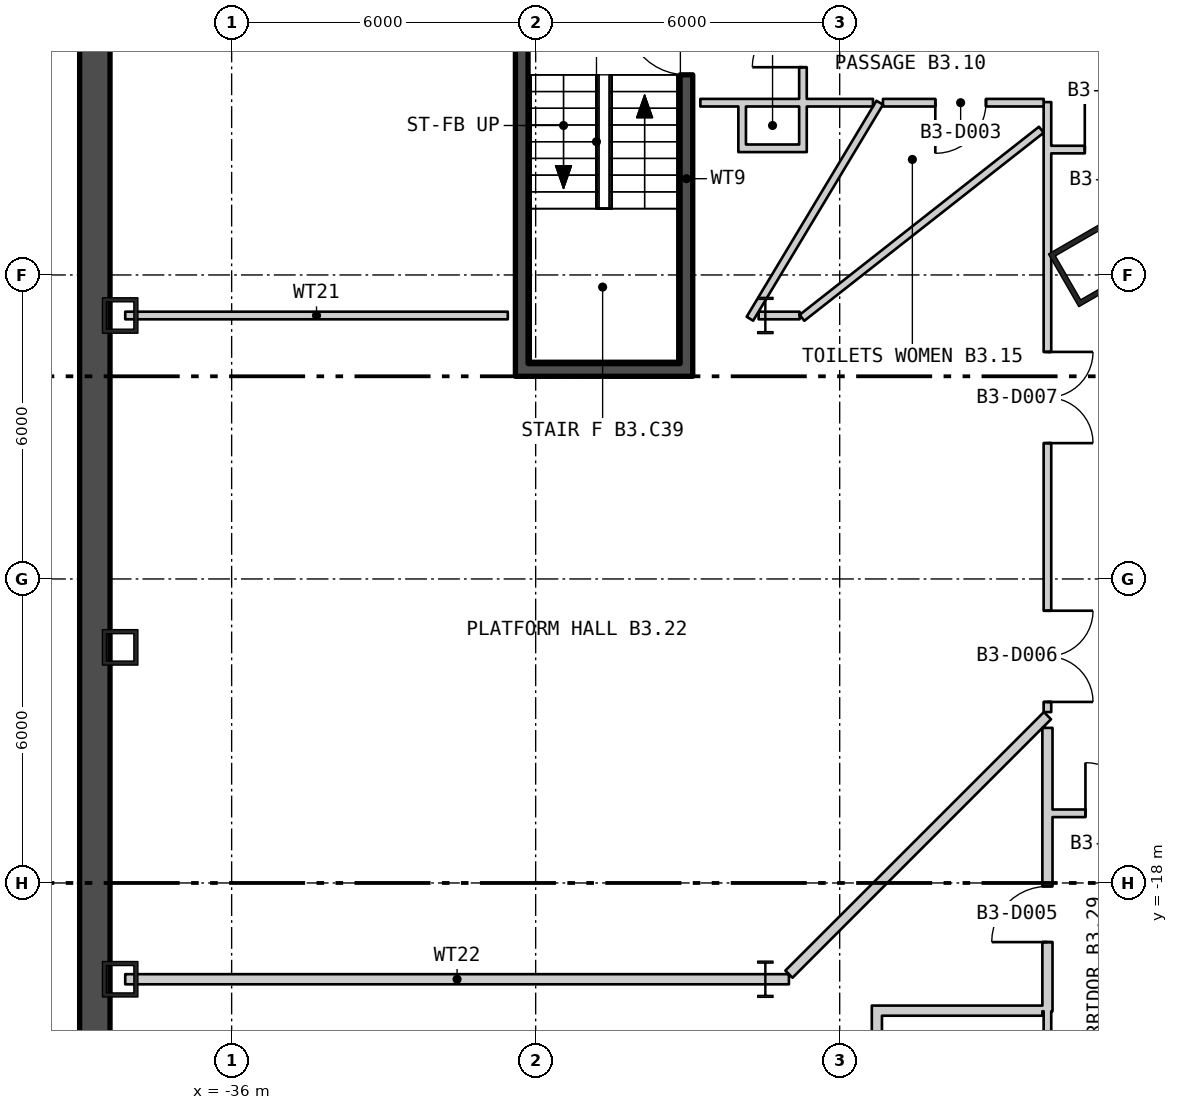
"""IFC4 building model, lengths in metres.
Left out: names, types, materials, properties, quantities, classifications, styles, units other than length and angle.
Written with IfcOpenShell. Run it as: python <this file> out.ifc"""

import sys

from ifc_helpers import new_model, si_unit, direction, frame, frame_2d, origin, origin_2d, place, context, subcontext, project, spatial, rectangle, hollow_rectangle, i_section, extrude, element, fill, save


model = new_model("IFC4")
c1 = context("Model", 3, precision=1e-05, world=origin(), true_north=direction((0.0, 1.0)))
c2 = subcontext(c1, "Body", "Model", "MODEL_VIEW")
j1 = project(units=[si_unit("LENGTHUNIT", "METRE"), si_unit("PLANEANGLEUNIT", "RADIAN")], contexts=[c1])
p1 = place(None, origin())
s1 = spatial("IfcSite", under=j1, at=p1, CompositionType="ELEMENT")
p2 = place(p1, origin())
s2 = spatial("IfcBuilding", under=s1, at=p2, CompositionType="ELEMENT")
p3 = place(p2, frame((0.0, 0.0, -16.8)))
s3 = spatial("IfcBuildingStorey", under=s2, at=p3, CompositionType="ELEMENT", Elevation=-16.8)
p4 = place(p3, frame((-19.061, -5.807, 0.0), z_axis=(0.0, 0.0, 1.0), x_axis=(0.5, -0.866025403784, 0.0)))
e1 = element("IfcColumn", 1, at=p4, inside=s3, PredefinedType="COLUMN", context=c2, shape_type="SweptSolid", body=[
    extrude(hollow_rectangle(XDim=1.2, YDim=1.2, WallThickness=0.1, at=origin_2d()), origin(), (0.0, 0.0, 1.0), 5.4),
])
for number, where, z_axis, x_axis in (
    (2, (-38.2, -6.8, 0.0), (0.0, 0.0, 1.0), (0.0, -1.0, 0.0)),
    (3, (-38.2, -13.35, 0.0), (0.0, 0.0, 1.0), (0.0, -1.0, 0.0)),
    (4, (-38.2, -19.9, 0.0), (0.0, 0.0, 1.0), (0.0, -1.0, 0.0)),
):
    element("IfcColumn", number, at=place(p3, frame(where, z_axis=z_axis, x_axis=x_axis)), inside=s3, PredefinedType="COLUMN", context=c2, shape_type="SweptSolid", body=[
        extrude(hollow_rectangle(XDim=0.7, YDim=0.7, WallThickness=0.08, at=origin_2d()), origin(), (0.0, 0.0, 1.0), 5.4),
    ])
for number, where, z_axis, x_axis in (
    (5, (-25.467, -6.8, 0.0), (0.0, 0.0, 1.0), (1.0, 0.0, 0.0)),
    (6, (-25.467, -19.9, 0.0), (0.0, 0.0, 1.0), (1.0, 0.0, 0.0)),
):
    element("IfcColumn", number, at=place(p3, frame(where, z_axis=z_axis, x_axis=x_axis)), inside=s3, PredefinedType="COLUMN", context=c2, shape_type="SweptSolid", body=[
        extrude(i_section(OverallWidth=0.304, OverallDepth=0.716, WebThickness=0.021, FlangeThickness=0.04, at=origin_2d()), origin(), (0.0, 0.0, 1.0), 5.4),
    ])
p5 = place(p3, frame((-38.7, -33.2, -0.4), z_axis=(0.0, 0.0, 1.0), x_axis=(0.0, 1.0, 0.0)))
e7 = element("IfcWall", 7, at=p5, inside=s3, PredefinedType="STANDARD", context=c2, shape_type="SweptSolid", body=[
    extrude(rectangle(XDim=52.8, YDim=0.6, at=frame_2d((26.4, 0.0))), origin(), (0.0, 0.0, 1.0), 5.4),
])
p6 = place(p3, frame((-30.275, -7.75, 0.0), z_axis=(0.0, 0.0, 1.0), x_axis=(0.0, 1.0, 0.0)))
e8 = element("IfcWall", 8, at=p6, inside=s3, PredefinedType="SHEAR", context=c2, shape_type="SweptSolid", body=[
    extrude(rectangle(XDim=7.3, YDim=0.25, at=frame_2d((3.65, 0.0))), origin(), (0.0, 0.0, 1.0), 4.95),
])
p7 = place(p3, frame((-27.025, -7.75, 0.0), z_axis=(0.0, 0.0, 1.0), x_axis=(0.0, 1.0, 0.0)))
e9 = element("IfcWall", 9, at=p7, inside=s3, PredefinedType="SHEAR", context=c2, shape_type="SweptSolid", body=[
    extrude(rectangle(XDim=7.3, YDim=0.25, at=frame_2d((3.65, 0.0))), origin(), (0.0, 0.0, 1.0), 4.95),
])
p8 = place(p7, frame((5.7, 0.0, 0.0)))
e10 = element("IfcOpeningElement", 10, at=p8, cuts=e9, PredefinedType="OPENING", context=c2, shape_type="SweptSolid", body=[
    extrude(rectangle(XDim=1.2, YDim=2.1, at=frame_2d((0.6, 1.05))), frame((0.0, 0.135, 0.0), z_axis=(0.0, -1.0, 0.0), x_axis=(1.0, 0.0, 0.0)), (0.0, 0.0, 1.0), 0.27),
])
p9 = place(p3, frame((-30.4, -7.875, 0.0), z_axis=(0.0, 0.0, 1.0), x_axis=(1.0, 0.0, 0.0)))
e11 = element("IfcWall", 11, at=p9, inside=s3, PredefinedType="SHEAR", context=c2, shape_type="SweptSolid", body=[
    extrude(rectangle(XDim=3.5, YDim=0.25, at=frame_2d((1.75, 0.0))), origin(), (0.0, 0.0, 1.0), 4.95),
])
p10 = place(p3, frame((-38.1, -19.9, 0.0), z_axis=(0.0, 0.0, 1.0), x_axis=(1.0, 0.0, 0.0)))
e12 = element("IfcWall", 12, at=p10, inside=s3, PredefinedType="PARTITIONING", context=c2, shape_type="SweptSolid", body=[
    extrude(rectangle(XDim=13.098, YDim=0.2, at=frame_2d((6.549, 0.0))), origin(), (0.0, 0.0, 1.0), 4.95),
])
p11 = place(p3, frame((-38.1, -6.8, 0.0), z_axis=(0.0, 0.0, 1.0), x_axis=(1.0, 0.0, 0.0)))
e13 = element("IfcWall", 13, at=p11, inside=s3, PredefinedType="PARTITIONING", context=c2, shape_type="SweptSolid", body=[
    extrude(rectangle(XDim=7.55, YDim=0.15, at=frame_2d((3.775, 0.0))), origin(), (0.0, 0.0, 1.0), 4.95),
])
p12 = place(p3, frame((-26.75, -2.6, 0.0), z_axis=(0.0, 0.0, 1.0), x_axis=(1.0, 0.0, 0.0)))
e14 = element("IfcWall", 14, at=p12, inside=s3, PredefinedType="PARTITIONING", context=c2, shape_type="SweptSolid", body=[
    extrude(rectangle(XDim=0.813, YDim=0.15, at=frame_2d((0.406, 0.0))), origin(), (0.0, 0.0, 1.0), 4.95),
])
p13 = place(p3, frame((-26.0, -3.5, 0.0), z_axis=(0.0, 0.0, 1.0), x_axis=(1.0, 0.0, 0.0)))
e15 = element("IfcWall", 15, at=p13, inside=s3, PredefinedType="PARTITIONING", context=c2, shape_type="SweptSolid", body=[
    extrude(rectangle(XDim=1.35, YDim=0.15, at=frame_2d((0.675, 0.0))), origin(), (0.0, 0.0, 1.0), 4.95),
])
p14 = place(p3, frame((-25.937, -2.6, 0.0), z_axis=(0.0, 0.0, 1.0), x_axis=(1.0, 0.0, 0.0)))
e16 = element("IfcWall", 16, at=p14, inside=s3, PredefinedType="PARTITIONING", context=c2, shape_type="SweptSolid", body=[
    extrude(rectangle(XDim=1.287, YDim=0.15, at=frame_2d((0.643, 0.0))), origin(), (0.0, 0.0, 1.0), 4.95),
])
p15 = place(p3, frame((-25.925, -3.425, 0.0), z_axis=(0.0, 0.0, 1.0), x_axis=(0.0, 1.0, 0.0)))
e17 = element("IfcWall", 17, at=p15, inside=s3, PredefinedType="PARTITIONING", context=c2, shape_type="SweptSolid", body=[
    extrude(rectangle(XDim=0.75, YDim=0.15, at=frame_2d((0.375, 0.0))), origin(), (0.0, 0.0, 1.0), 4.95),
])
p16 = place(p3, frame((-25.772, -6.864, 0.0), z_axis=(0.0, 0.0, 1.0), x_axis=(0.515027783153, 0.85717348453, 0.0)))
e18 = element("IfcWall", 18, at=p16, inside=s3, PredefinedType="PARTITIONING", context=c2, shape_type="SweptSolid", body=[
    extrude(rectangle(XDim=4.974, YDim=0.15, at=frame_2d((2.487, 0.0))), origin(), (0.0, 0.0, 1.0), 4.95),
])
p17 = place(p3, frame((-25.6, -6.8, 0.0), z_axis=(0.0, 0.0, 1.0), x_axis=(1.0, 0.0, 0.0)))
e19 = element("IfcWall", 19, at=p17, inside=s3, PredefinedType="PARTITIONING", context=c2, shape_type="SweptSolid", body=[
    extrude(rectangle(XDim=0.809, YDim=0.15, at=frame_2d((0.405, 0.0))), origin(), (0.0, 0.0, 1.0), 4.95),
])
p18 = place(p3, frame((-25.002, -19.8, 0.0), z_axis=(0.0, 0.0, 1.0), x_axis=(0.707106781187, 0.707106781187, 0.0)))
e20 = element("IfcWall", 20, at=p18, inside=s3, PredefinedType="PARTITIONING", context=c2, shape_type="SweptSolid", body=[
    extrude(rectangle(XDim=7.215, YDim=0.2, at=frame_2d((3.608, 0.0))), origin(), (0.0, 0.0, 1.0), 4.95),
])
p19 = place(p3, frame((-24.745, -6.846, 0.0), z_axis=(0.0, 0.0, 1.0), x_axis=(0.786295235231, 0.617850955372, 0.0)))
e21 = element("IfcWall", 21, at=p19, inside=s3, PredefinedType="PARTITIONING", context=c2, shape_type="SweptSolid", body=[
    extrude(rectangle(XDim=6.008, YDim=0.15, at=frame_2d((3.004, 0.0))), origin(), (0.0, 0.0, 1.0), 4.95),
])
p20 = place(p3, frame((-24.725, -3.425, 0.0), z_axis=(0.0, 0.0, 1.0), x_axis=(0.0, 1.0, 0.0)))
e22 = element("IfcWall", 22, at=p20, inside=s3, PredefinedType="PARTITIONING", context=c2, shape_type="SweptSolid", body=[
    extrude(rectangle(XDim=0.75, YDim=0.15, at=frame_2d((0.375, 0.0))), origin(), (0.0, 0.0, 1.0), 4.95),
])
p21 = place(p3, frame((-24.725, -2.525, 0.0), z_axis=(0.0, 0.0, 1.0), x_axis=(0.0, 1.0, 0.0)))
e23 = element("IfcWall", 23, at=p21, inside=s3, PredefinedType="PARTITIONING", context=c2, shape_type="SweptSolid", body=[
    extrude(rectangle(XDim=2.25, YDim=0.15, at=frame_2d((1.125, 0.0))), origin(), (0.0, 0.0, 1.0), 4.95),
])
p22 = place(p21, frame((0.625, 0.0, 0.0)))
e24 = element("IfcOpeningElement", 24, at=p22, cuts=e23, PredefinedType="OPENING", context=c2, shape_type="SweptSolid", body=[
    extrude(rectangle(XDim=1.0, YDim=2.1, at=frame_2d((0.5, 1.05))), frame((0.0, 0.085, 0.0), z_axis=(0.0, -1.0, 0.0), x_axis=(1.0, 0.0, 0.0)), (0.0, 0.0, 1.0), 0.17),
])
p23 = place(p3, frame((-24.65, -2.6, 0.0), z_axis=(0.0, 0.0, 1.0), x_axis=(1.0, 0.0, 0.0)))
e25 = element("IfcWall", 25, at=p23, inside=s3, PredefinedType="PARTITIONING", context=c2, shape_type="SweptSolid", body=[
    extrude(rectangle(XDim=1.307, YDim=0.15, at=frame_2d((0.653, 0.0))), origin(), (0.0, 0.0, 1.0), 4.95),
])
p24 = place(p3, frame((-23.366, -20.52, 0.0), z_axis=(0.0, 0.0, 1.0), x_axis=(1.0, 0.0, 0.0)))
e26 = element("IfcWall", 26, at=p24, inside=s3, PredefinedType="PARTITIONING", context=c2, shape_type="SweptSolid", body=[
    extrude(rectangle(XDim=3.366, YDim=0.2, at=frame_2d((1.683, 0.0))), origin(), (0.0, 0.0, 1.0), 4.95),
])
p25 = place(p3, frame((-23.266, -23.45, 0.0), z_axis=(0.0, 0.0, 1.0), x_axis=(0.0, 1.0, 0.0)))
e27 = element("IfcWall", 27, at=p25, inside=s3, PredefinedType="PARTITIONING", context=c2, shape_type="SweptSolid", body=[
    extrude(rectangle(XDim=2.83, YDim=0.2, at=frame_2d((1.415, 0.0))), origin(), (0.0, 0.0, 1.0), 4.95),
])
p26 = place(p3, frame((-23.146, -2.6, 0.0), z_axis=(0.0, 0.0, 1.0), x_axis=(1.0, 0.0, 0.0)))
e28 = element("IfcWall", 28, at=p26, inside=s3, PredefinedType="PARTITIONING", context=c2, shape_type="SweptSolid", body=[
    extrude(rectangle(XDim=3.171, YDim=0.15, at=frame_2d((1.585, 0.0))), origin(), (0.0, 0.0, 1.0), 4.95),
])
p27 = place(p26, frame((1.033, 0.0, 0.0)))
e29 = element("IfcOpeningElement", 29, at=p27, cuts=e28, PredefinedType="OPENING", context=c2, shape_type="SweptSolid", body=[
    extrude(rectangle(XDim=1.0, YDim=2.1, at=frame_2d((0.5, 1.05))), frame((0.0, 0.085, 0.0), z_axis=(0.0, -1.0, 0.0), x_axis=(1.0, 0.0, 0.0)), (0.0, 0.0, 1.0), 0.17),
])
p28 = place(p3, frame((-19.9, -23.45, 0.0), z_axis=(0.0, 0.0, 1.0), x_axis=(0.0, 1.0, 0.0)))
e30 = element("IfcWall", 30, at=p28, inside=s3, PredefinedType="PARTITIONING", context=c2, shape_type="SweptSolid", body=[
    extrude(rectangle(XDim=2.918, YDim=0.15, at=frame_2d((1.459, 0.0))), origin(), (0.0, 0.0, 1.0), 4.95),
])
p29 = place(p28, frame((0.908, 0.0, 0.0)))
e31 = element("IfcOpeningElement", 31, at=p29, cuts=e30, PredefinedType="OPENING", context=c2, shape_type="SweptSolid", body=[
    extrude(rectangle(XDim=1.0, YDim=2.1, at=frame_2d((0.5, 1.05))), frame((0.0, 0.085, 0.0), z_axis=(0.0, -1.0, 0.0), x_axis=(1.0, 0.0, 0.0)), (0.0, 0.0, 1.0), 0.17),
])
p30 = place(p3, frame((-19.9, -20.532, 0.0), z_axis=(0.0, 0.0, 1.0), x_axis=(0.0, 1.0, 0.0)))
e32 = element("IfcWall", 32, at=p30, inside=s3, PredefinedType="PARTITIONING", context=c2, shape_type="SweptSolid", body=[
    extrude(rectangle(XDim=5.593, YDim=0.2, at=frame_2d((2.796, 0.0))), origin(), (0.0, 0.0, 1.0), 4.95),
])
p31 = place(p30, frame((1.365, 0.0, 0.0)))
e33 = element("IfcOpeningElement", 33, at=p31, cuts=e32, PredefinedType="OPENING", context=c2, shape_type="SweptSolid", body=[
    extrude(rectangle(XDim=1.1, YDim=2.1, at=frame_2d((0.55, 1.05))), frame((0.0, 0.11, 0.0), z_axis=(0.0, -1.0, 0.0), x_axis=(1.0, 0.0, 0.0)), (0.0, 0.0, 1.0), 0.22),
])
p32 = place(p3, frame((-19.9, -14.627, 0.0), z_axis=(0.0, 0.0, 1.0), x_axis=(0.0, 1.0, 0.0)))
e34 = element("IfcWall", 34, at=p32, inside=s3, PredefinedType="PARTITIONING", context=c2, shape_type="SweptSolid", body=[
    extrude(rectangle(XDim=12.039, YDim=0.15, at=frame_2d((6.019, 0.0))), origin(), (0.0, 0.0, 1.0), 4.95),
])
p33 = place(p32, frame((0.2, 0.0, 0.0)))
e35 = element("IfcOpeningElement", 35, at=p33, cuts=e34, PredefinedType="OPENING", context=c2, shape_type="SweptSolid", body=[
    extrude(rectangle(XDim=1.8, YDim=2.1, at=frame_2d((0.9, 1.05))), frame((0.0, 0.085, 0.0), z_axis=(0.0, -1.0, 0.0), x_axis=(1.0, 0.0, 0.0)), (0.0, 0.0, 1.0), 0.17),
])
p34 = place(p32, frame((5.308, 0.0, 0.0)))
e36 = element("IfcOpeningElement", 36, at=p34, cuts=e34, PredefinedType="OPENING", context=c2, shape_type="SweptSolid", body=[
    extrude(rectangle(XDim=1.8, YDim=2.1, at=frame_2d((0.9, 1.05))), frame((0.0, 0.085, 0.0), z_axis=(0.0, -1.0, 0.0), x_axis=(1.0, 0.0, 0.0)), (0.0, 0.0, 1.0), 0.17),
])
p35 = place(p3, frame((-19.825, -3.525, 0.0), z_axis=(0.0, 0.0, 1.0), x_axis=(1.0, 0.0, 0.0)))
e37 = element("IfcWall", 37, at=p35, inside=s3, PredefinedType="PARTITIONING", context=c2, shape_type="SweptSolid", body=[
    extrude(rectangle(XDim=2.325, YDim=0.15, at=frame_2d((1.163, 0.0))), origin(), (0.0, 0.0, 1.0), 4.95),
])
p36 = place(p35, frame((0.662, 0.0, 0.0)))
e38 = element("IfcOpeningElement", 38, at=p36, cuts=e37, PredefinedType="OPENING", context=c2, shape_type="SweptSolid", body=[
    extrude(rectangle(XDim=1.0, YDim=2.1, at=frame_2d((0.5, 1.05))), frame((0.0, 0.085, 0.0), z_axis=(0.0, -1.0, 0.0), x_axis=(1.0, 0.0, 0.0)), (0.0, 0.0, 1.0), 0.17),
])
p37 = place(p3, frame((-19.8, -16.625, 0.0), z_axis=(0.0, 0.0, 1.0), x_axis=(1.0, 0.0, 0.0)))
e39 = element("IfcWall", 39, at=p37, inside=s3, PredefinedType="PARTITIONING", context=c2, shape_type="SweptSolid", body=[
    extrude(rectangle(XDim=2.3, YDim=0.15, at=frame_2d((1.15, 0.0))), origin(), (0.0, 0.0, 1.0), 4.95),
])
p38 = place(p37, frame((0.65, 0.0, 0.0)))
e40 = element("IfcOpeningElement", 40, at=p38, cuts=e39, PredefinedType="OPENING", context=c2, shape_type="SweptSolid", body=[
    extrude(rectangle(XDim=1.0, YDim=2.1, at=frame_2d((0.5, 1.05))), frame((0.0, 0.085, 0.0), z_axis=(0.0, -1.0, 0.0), x_axis=(1.0, 0.0, 0.0)), (0.0, 0.0, 1.0), 0.17),
])
p39 = place(p8, origin())
e41 = element("IfcDoor", 41, at=p39, inside=s3, OperationType="SINGLE_SWING_LEFT", PredefinedType="DOOR", context=c2, shape_type="SweptSolid", body=[
    extrude(rectangle(XDim=1.2, YDim=2.1, at=frame_2d((0.6, 1.05))), frame((0.0, 0.025, 0.0), z_axis=(0.0, -1.0, 0.0), x_axis=(1.0, 0.0, 0.0)), (0.0, 0.0, 1.0), 0.05),
])
fill(e10, e41)
p40 = place(p22, origin())
e42 = element("IfcDoor", 42, at=p40, inside=s3, OperationType="SINGLE_SWING_RIGHT", PredefinedType="DOOR", context=c2, shape_type="SweptSolid", body=[
    extrude(rectangle(XDim=1.0, YDim=2.1, at=frame_2d((0.5, 1.05))), frame((0.0, 0.025, 0.0), z_axis=(0.0, -1.0, 0.0), x_axis=(1.0, 0.0, 0.0)), (0.0, 0.0, 1.0), 0.05),
])
fill(e24, e42)
p41 = place(p27, origin())
e43 = element("IfcDoor", 43, at=p41, inside=s3, OperationType="SINGLE_SWING_LEFT", PredefinedType="DOOR", context=c2, shape_type="SweptSolid", body=[
    extrude(rectangle(XDim=1.0, YDim=2.1, at=frame_2d((0.5, 1.05))), frame((0.0, 0.025, 0.0), z_axis=(0.0, -1.0, 0.0), x_axis=(1.0, 0.0, 0.0)), (0.0, 0.0, 1.0), 0.05),
])
fill(e29, e43)
p42 = place(p31, origin())
e44 = element("IfcDoor", 44, at=p42, inside=s3, OperationType="SINGLE_SWING_RIGHT", PredefinedType="DOOR", context=c2, shape_type="SweptSolid", body=[
    extrude(rectangle(XDim=1.1, YDim=2.1, at=frame_2d((0.55, 1.05))), frame((0.0, 0.025, 0.0), z_axis=(0.0, -1.0, 0.0), x_axis=(1.0, 0.0, 0.0)), (0.0, 0.0, 1.0), 0.05),
])
fill(e33, e44)
p43 = place(p33, origin())
e45 = element("IfcDoor", 45, at=p43, inside=s3, OperationType="DOUBLE_DOOR_SINGLE_SWING", PredefinedType="DOOR", context=c2, shape_type="SweptSolid", body=[
    extrude(rectangle(XDim=1.8, YDim=2.1, at=frame_2d((0.9, 1.05))), frame((0.0, 0.025, 0.0), z_axis=(0.0, -1.0, 0.0), x_axis=(1.0, 0.0, 0.0)), (0.0, 0.0, 1.0), 0.05),
])
fill(e35, e45)
p44 = place(p34, origin())
e46 = element("IfcDoor", 46, at=p44, inside=s3, OperationType="DOUBLE_DOOR_SINGLE_SWING", PredefinedType="DOOR", context=c2, shape_type="SweptSolid", body=[
    extrude(rectangle(XDim=1.8, YDim=2.1, at=frame_2d((0.9, 1.05))), frame((0.0, 0.025, 0.0), z_axis=(0.0, -1.0, 0.0), x_axis=(1.0, 0.0, 0.0)), (0.0, 0.0, 1.0), 0.05),
])
fill(e36, e46)
p45 = place(p36, origin())
e47 = element("IfcDoor", 47, at=p45, inside=s3, OperationType="SINGLE_SWING_RIGHT", PredefinedType="DOOR", context=c2, shape_type="SweptSolid", body=[
    extrude(rectangle(XDim=1.0, YDim=2.1, at=frame_2d((0.5, 1.05))), frame((0.0, 0.025, 0.0), z_axis=(0.0, -1.0, 0.0), x_axis=(1.0, 0.0, 0.0)), (0.0, 0.0, 1.0), 0.05),
])
fill(e38, e47)
p46 = place(p38, origin())
e48 = element("IfcDoor", 48, at=p46, inside=s3, OperationType="SINGLE_SWING_RIGHT", PredefinedType="DOOR", context=c2, shape_type="SweptSolid", body=[
    extrude(rectangle(XDim=1.0, YDim=2.1, at=frame_2d((0.5, 1.05))), frame((0.0, 0.025, 0.0), z_axis=(0.0, -1.0, 0.0), x_axis=(1.0, 0.0, 0.0)), (0.0, 0.0, 1.0), 0.05),
])
fill(e40, e48)
save(model, sys.argv[1])
